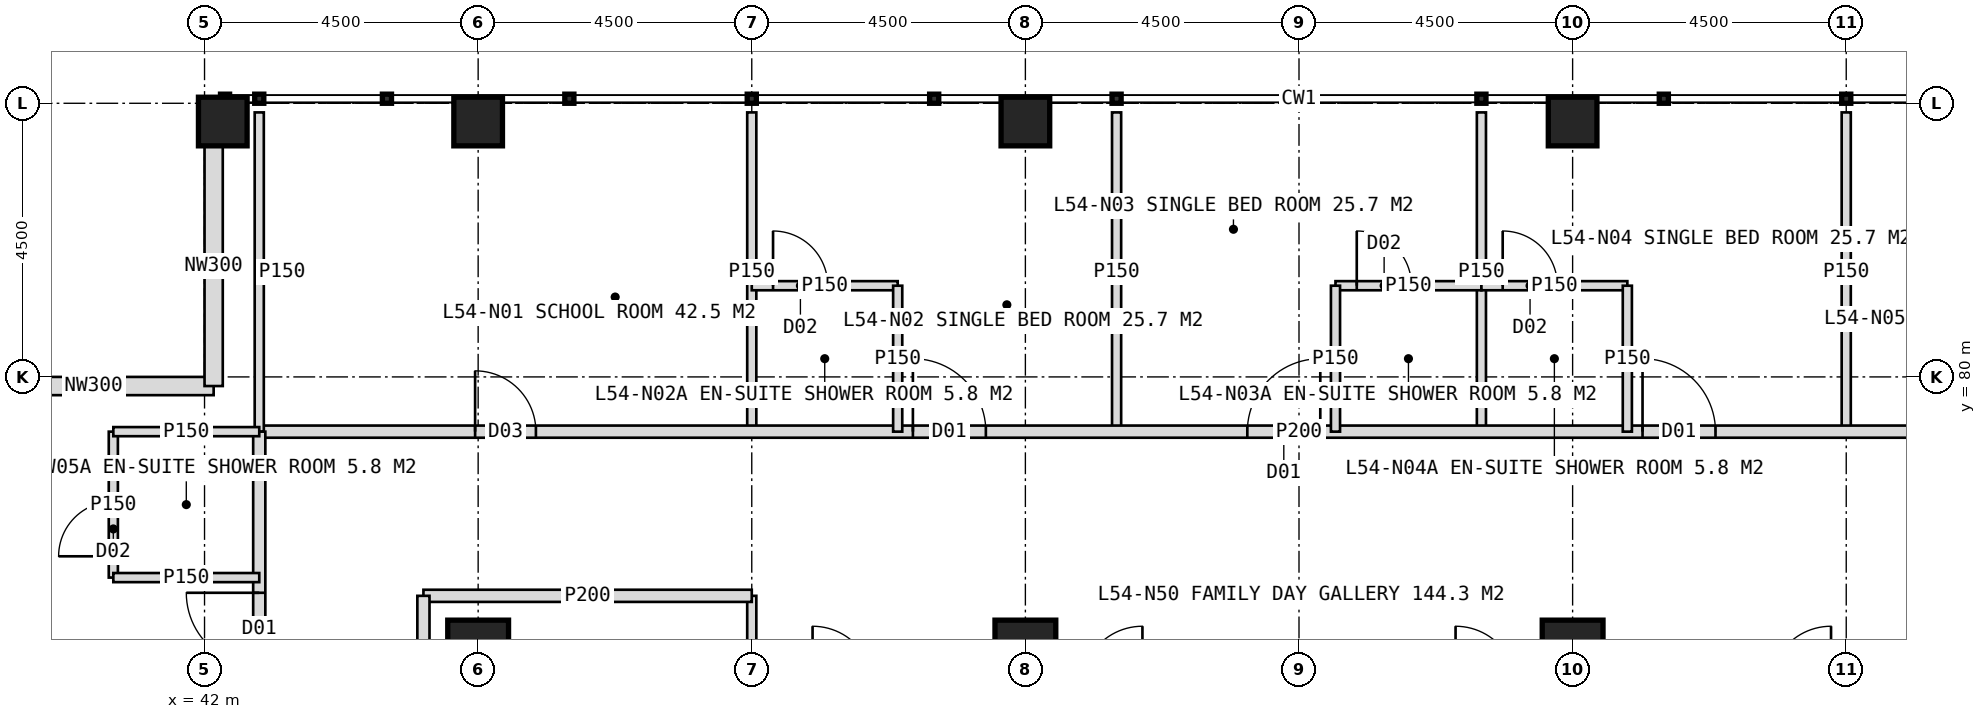
"""IFC4 building model, lengths in metres.
Left out: names, types, materials, properties, quantities, classifications, styles, units other than length and angle.
Written with IfcOpenShell. Run it as: python <this file> out.ifc"""

import sys

from ifc_helpers import new_model, si_unit, direction, frame, frame_2d, origin, origin_2d, place, context, subcontext, project, spatial, rectangle, hollow_rectangle, extrude, element, fill, save


model = new_model("IFC4")
c1 = context("Model", 3, precision=1e-05, world=origin(), true_north=direction((0.0, 1.0)))
c2 = subcontext(c1, "Body", "Model", "MODEL_VIEW")
j1 = project(units=[si_unit("LENGTHUNIT", "METRE"), si_unit("PLANEANGLEUNIT", "RADIAN")], contexts=[c1])
p1 = place(None, origin())
s1 = spatial("IfcSite", under=j1, at=p1, CompositionType="ELEMENT")
p2 = place(p1, origin())
s2 = spatial("IfcBuilding", under=s1, at=p2, CompositionType="ELEMENT")
p3 = place(p2, frame((0.0, 0.0, 225.0)))
s3 = spatial("IfcBuildingStorey", under=s2, at=p3, CompositionType="ELEMENT", Elevation=225.0)
for number, where, z_axis, x_axis in (
    (1, (46.5, 75.5, 0.0), (0.0, 0.0, 1.0), (1.0, 0.0, 0.0)),
    (2, (55.5, 75.5, 0.0), (0.0, 0.0, 1.0), (1.0, 0.0, 0.0)),
    (3, (64.5, 75.5, 0.0), (0.0, 0.0, 1.0), (1.0, 0.0, 0.0)),
):
    element("IfcColumn", number, at=place(p3, frame(where, z_axis=z_axis, x_axis=x_axis)), inside=s3, PredefinedType="COLUMN", context=c2, shape_type="SweptSolid", body=[
        extrude(hollow_rectangle(XDim=1.0, YDim=1.0, WallThickness=0.1, at=origin_2d()), origin(), (0.0, 0.0, 1.0), 4.0),
    ])
for number, where, z_axis, x_axis in (
    (4, (42.3, 84.2, 0.0), (0.0, 0.0, 1.0), (1.0, 0.0, 0.0)),
    (5, (46.5, 84.2, 0.0), (0.0, 0.0, 1.0), (1.0, 0.0, 0.0)),
    (6, (55.5, 84.2, 0.0), (0.0, 0.0, 1.0), (1.0, 0.0, 0.0)),
    (7, (64.5, 84.2, 0.0), (0.0, 0.0, 1.0), (1.0, 0.0, 0.0)),
):
    element("IfcColumn", number, at=place(p3, frame(where, z_axis=z_axis, x_axis=x_axis)), inside=s3, PredefinedType="COLUMN", context=c2, shape_type="SweptSolid", body=[
        extrude(hollow_rectangle(XDim=0.8, YDim=0.8, WallThickness=0.08, at=origin_2d()), origin(), (0.0, 0.0, 1.0), 4.0),
    ])
for number, where, z_axis, x_axis in (
    (8, (38.2, 79.85, 0.0), (0.0, 0.0, 1.0), (1.0, 0.0, 0.0)),
    (9, (42.15, 79.85, 0.0), (0.0, 0.0, 1.0), (0.0, 1.0, 0.0)),
):
    element("IfcWall", number, at=place(p3, frame(where, z_axis=z_axis, x_axis=x_axis)), inside=s3, PredefinedType="ELEMENTEDWALL", context=c2, shape_type="SweptSolid", body=[
        extrude(rectangle(XDim=3.95, YDim=0.3, at=frame_2d((1.975, 0.0))), origin(), (0.0, 0.0, 1.0), 2.85),
    ])
for number, where, z_axis, x_axis in (
    (10, (51.0, 79.1, 0.0), (0.0, 0.0, 1.0), (0.0, 1.0, 0.0)),
    (11, (57.0, 79.1, 0.0), (0.0, 0.0, 1.0), (0.0, 1.0, 0.0)),
    (12, (63.0, 79.1, 0.0), (0.0, 0.0, 1.0), (0.0, 1.0, 0.0)),
    (13, (69.0, 79.1, 0.0), (0.0, 0.0, 1.0), (0.0, 1.0, 0.0)),
):
    element("IfcWall", number, at=place(p3, frame(where, z_axis=z_axis, x_axis=x_axis)), inside=s3, PredefinedType="PARTITIONING", context=c2, shape_type="SweptSolid", body=[
        extrude(rectangle(XDim=5.25, YDim=0.15, at=frame_2d((2.625, 0.0))), origin(), (0.0, 0.0, 1.0), 3.75),
    ])
p4 = place(p3, frame((42.9, 79.1, 0.0), z_axis=(0.0, 0.0, 1.0), x_axis=(1.0, 0.0, 0.0)))
e14 = element("IfcWall", 14, at=p4, inside=s3, PredefinedType="PARTITIONING", context=c2, shape_type="SweptSolid", body=[
    extrude(rectangle(XDim=34.2, YDim=0.2, at=frame_2d((17.1, 0.0))), origin(), (0.0, 0.0, 1.0), 3.75),
])
p5 = place(p4, frame((3.55, 0.0, 0.0)))
e15 = element("IfcOpeningElement", 15, at=p5, cuts=e14, PredefinedType="OPENING", context=c2, shape_type="SweptSolid", body=[
    extrude(rectangle(XDim=1.0, YDim=2.1, at=frame_2d((0.5, 1.05))), frame((0.0, 0.11, 0.0), z_axis=(0.0, -1.0, 0.0), x_axis=(1.0, 0.0, 0.0)), (0.0, 0.0, 1.0), 0.22),
])
p6 = place(p4, frame((10.75, 0.0, 0.0)))
e16 = element("IfcOpeningElement", 16, at=p6, cuts=e14, PredefinedType="OPENING", context=c2, shape_type="SweptSolid", body=[
    extrude(rectangle(XDim=1.2, YDim=2.2, at=frame_2d((0.6, 1.1))), frame((0.0, 0.11, 0.0), z_axis=(0.0, -1.0, 0.0), x_axis=(1.0, 0.0, 0.0)), (0.0, 0.0, 1.0), 0.22),
])
p7 = place(p4, frame((16.25, 0.0, 0.0)))
e17 = element("IfcOpeningElement", 17, at=p7, cuts=e14, PredefinedType="OPENING", context=c2, shape_type="SweptSolid", body=[
    extrude(rectangle(XDim=1.2, YDim=2.2, at=frame_2d((0.6, 1.1))), frame((0.0, 0.11, 0.0), z_axis=(0.0, -1.0, 0.0), x_axis=(1.0, 0.0, 0.0)), (0.0, 0.0, 1.0), 0.22),
])
p8 = place(p4, frame((22.75, 0.0, 0.0)))
e18 = element("IfcOpeningElement", 18, at=p8, cuts=e14, PredefinedType="OPENING", context=c2, shape_type="SweptSolid", body=[
    extrude(rectangle(XDim=1.2, YDim=2.2, at=frame_2d((0.6, 1.1))), frame((0.0, 0.11, 0.0), z_axis=(0.0, -1.0, 0.0), x_axis=(1.0, 0.0, 0.0)), (0.0, 0.0, 1.0), 0.22),
])
p9 = place(p4, frame((29.75, 0.0, 0.0)))
e19 = element("IfcOpeningElement", 19, at=p9, cuts=e14, PredefinedType="OPENING", context=c2, shape_type="SweptSolid", body=[
    extrude(rectangle(XDim=1.2, YDim=2.2, at=frame_2d((0.6, 1.1))), frame((0.0, 0.11, 0.0), z_axis=(0.0, -1.0, 0.0), x_axis=(1.0, 0.0, 0.0)), (0.0, 0.0, 1.0), 0.22),
])
p10 = place(p3, frame((42.9, 79.1, 0.0), z_axis=(0.0, 0.0, 1.0), x_axis=(0.0, 1.0, 0.0)))
e20 = element("IfcWall", 20, at=p10, inside=s3, PredefinedType="PARTITIONING", context=c2, shape_type="SweptSolid", body=[
    extrude(rectangle(XDim=5.25, YDim=0.15, at=frame_2d((2.625, 0.0))), origin(), (0.0, 0.0, 1.0), 3.75),
])
p11 = place(p3, frame((51.0, 81.5, 0.0), z_axis=(0.0, 0.0, 1.0), x_axis=(1.0, 0.0, 0.0)))
e21 = element("IfcWall", 21, at=p11, inside=s3, PredefinedType="PARTITIONING", context=c2, shape_type="SweptSolid", body=[
    extrude(rectangle(XDim=2.4, YDim=0.15, at=frame_2d((1.2, 0.0))), origin(), (0.0, 0.0, 1.0), 3.75),
])
p12 = place(p11, frame((0.35, 0.0, 0.0)))
e22 = element("IfcOpeningElement", 22, at=p12, cuts=e21, PredefinedType="OPENING", context=c2, shape_type="SweptSolid", body=[
    extrude(rectangle(XDim=0.9, YDim=2.1, at=frame_2d((0.45, 1.05))), frame((0.0, 0.085, 0.0), z_axis=(0.0, -1.0, 0.0), x_axis=(1.0, 0.0, 0.0)), (0.0, 0.0, 1.0), 0.17),
])
p13 = place(p3, frame((53.4, 79.1, 0.0), z_axis=(0.0, 0.0, 1.0), x_axis=(0.0, 1.0, 0.0)))
e23 = element("IfcWall", 23, at=p13, inside=s3, PredefinedType="PARTITIONING", context=c2, shape_type="SweptSolid", body=[
    extrude(rectangle(XDim=2.4, YDim=0.15, at=frame_2d((1.2, 0.0))), origin(), (0.0, 0.0, 1.0), 3.75),
])
p14 = place(p3, frame((60.6, 81.5, 0.0), z_axis=(0.0, 0.0, 1.0), x_axis=(1.0, 0.0, 0.0)))
e24 = element("IfcWall", 24, at=p14, inside=s3, PredefinedType="PARTITIONING", context=c2, shape_type="SweptSolid", body=[
    extrude(rectangle(XDim=2.4, YDim=0.15, at=frame_2d((1.2, 0.0))), origin(), (0.0, 0.0, 1.0), 3.75),
])
p15 = place(p14, frame((0.35, 0.0, 0.0)))
e25 = element("IfcOpeningElement", 25, at=p15, cuts=e24, PredefinedType="OPENING", context=c2, shape_type="SweptSolid", body=[
    extrude(rectangle(XDim=0.9, YDim=2.1, at=frame_2d((0.45, 1.05))), frame((0.0, 0.085, 0.0), z_axis=(0.0, -1.0, 0.0), x_axis=(1.0, 0.0, 0.0)), (0.0, 0.0, 1.0), 0.17),
])
p16 = place(p3, frame((60.6, 79.1, 0.0), z_axis=(0.0, 0.0, 1.0), x_axis=(0.0, 1.0, 0.0)))
e26 = element("IfcWall", 26, at=p16, inside=s3, PredefinedType="PARTITIONING", context=c2, shape_type="SweptSolid", body=[
    extrude(rectangle(XDim=2.4, YDim=0.15, at=frame_2d((1.2, 0.0))), origin(), (0.0, 0.0, 1.0), 3.75),
])
p17 = place(p3, frame((63.0, 81.5, 0.0), z_axis=(0.0, 0.0, 1.0), x_axis=(1.0, 0.0, 0.0)))
e27 = element("IfcWall", 27, at=p17, inside=s3, PredefinedType="PARTITIONING", context=c2, shape_type="SweptSolid", body=[
    extrude(rectangle(XDim=2.4, YDim=0.15, at=frame_2d((1.2, 0.0))), origin(), (0.0, 0.0, 1.0), 3.75),
])
p18 = place(p17, frame((0.35, 0.0, 0.0)))
e28 = element("IfcOpeningElement", 28, at=p18, cuts=e27, PredefinedType="OPENING", context=c2, shape_type="SweptSolid", body=[
    extrude(rectangle(XDim=0.9, YDim=2.1, at=frame_2d((0.45, 1.05))), frame((0.0, 0.085, 0.0), z_axis=(0.0, -1.0, 0.0), x_axis=(1.0, 0.0, 0.0)), (0.0, 0.0, 1.0), 0.17),
])
p19 = place(p3, frame((65.4, 79.1, 0.0), z_axis=(0.0, 0.0, 1.0), x_axis=(0.0, 1.0, 0.0)))
e29 = element("IfcWall", 29, at=p19, inside=s3, PredefinedType="PARTITIONING", context=c2, shape_type="SweptSolid", body=[
    extrude(rectangle(XDim=2.4, YDim=0.15, at=frame_2d((1.2, 0.0))), origin(), (0.0, 0.0, 1.0), 3.75),
])
p20 = place(p3, frame((51.0, 71.0, 0.0), z_axis=(0.0, 0.0, 1.0), x_axis=(0.0, 1.0, 0.0)))
e30 = element("IfcWall", 30, at=p20, inside=s3, PredefinedType="PARTITIONING", context=c2, shape_type="SweptSolid", body=[
    extrude(rectangle(XDim=5.4, YDim=0.15, at=frame_2d((2.7, 0.0))), origin(), (0.0, 0.0, 1.0), 3.75),
])
p21 = place(p3, frame((45.6, 76.4, 0.0), z_axis=(0.0, 0.0, 1.0), x_axis=(1.0, 0.0, 0.0)))
e31 = element("IfcWall", 31, at=p21, inside=s3, PredefinedType="PARTITIONING", context=c2, shape_type="SweptSolid", body=[
    extrude(rectangle(XDim=5.4, YDim=0.2, at=frame_2d((2.7, 0.0))), origin(), (0.0, 0.0, 1.0), 3.75),
])
p22 = place(p3, frame((42.9, 44.9, 0.0), z_axis=(0.0, 0.0, 1.0), x_axis=(0.0, 1.0, 0.0)))
e32 = element("IfcWall", 32, at=p22, inside=s3, PredefinedType="PARTITIONING", context=c2, shape_type="SweptSolid", body=[
    extrude(rectangle(XDim=34.2, YDim=0.2, at=frame_2d((17.1, 0.0))), origin(), (0.0, 0.0, 1.0), 3.75),
])
p23 = place(p22, frame((1.25, 0.0, 0.0)))
e33 = element("IfcOpeningElement", 33, at=p23, cuts=e32, PredefinedType="OPENING", context=c2, shape_type="SweptSolid", body=[
    extrude(rectangle(XDim=1.2, YDim=2.2, at=frame_2d((0.6, 1.1))), frame((0.0, 0.11, 0.0), z_axis=(0.0, -1.0, 0.0), x_axis=(1.0, 0.0, 0.0)), (0.0, 0.0, 1.0), 0.22),
])
p24 = place(p22, frame((7.75, 0.0, 0.0)))
e34 = element("IfcOpeningElement", 34, at=p24, cuts=e32, PredefinedType="OPENING", context=c2, shape_type="SweptSolid", body=[
    extrude(rectangle(XDim=1.2, YDim=2.2, at=frame_2d((0.6, 1.1))), frame((0.0, 0.11, 0.0), z_axis=(0.0, -1.0, 0.0), x_axis=(1.0, 0.0, 0.0)), (0.0, 0.0, 1.0), 0.22),
])
p25 = place(p22, frame((13.6, 0.0, 0.0)))
e35 = element("IfcOpeningElement", 35, at=p25, cuts=e32, PredefinedType="OPENING", context=c2, shape_type="SweptSolid", body=[
    extrude(rectangle(XDim=1.0, YDim=2.1, at=frame_2d((0.5, 1.05))), frame((0.0, 0.11, 0.0), z_axis=(0.0, -1.0, 0.0), x_axis=(1.0, 0.0, 0.0)), (0.0, 0.0, 1.0), 0.22),
])
p26 = place(p22, frame((19.75, 0.0, 0.0)))
e36 = element("IfcOpeningElement", 36, at=p26, cuts=e32, PredefinedType="OPENING", context=c2, shape_type="SweptSolid", body=[
    extrude(rectangle(XDim=1.2, YDim=2.2, at=frame_2d((0.6, 1.1))), frame((0.0, 0.11, 0.0), z_axis=(0.0, -1.0, 0.0), x_axis=(1.0, 0.0, 0.0)), (0.0, 0.0, 1.0), 0.22),
])
p27 = place(p22, frame((30.35, 0.0, 0.0)))
e37 = element("IfcOpeningElement", 37, at=p27, cuts=e32, PredefinedType="OPENING", context=c2, shape_type="SweptSolid", body=[
    extrude(rectangle(XDim=1.2, YDim=2.2, at=frame_2d((0.6, 1.1))), frame((0.0, 0.11, 0.0), z_axis=(0.0, -1.0, 0.0), x_axis=(1.0, 0.0, 0.0)), (0.0, 0.0, 1.0), 0.22),
])
p28 = place(p3, frame((40.5, 76.7, 0.0), z_axis=(0.0, 0.0, 1.0), x_axis=(0.0, 1.0, 0.0)))
e38 = element("IfcWall", 38, at=p28, inside=s3, PredefinedType="PARTITIONING", context=c2, shape_type="SweptSolid", body=[
    extrude(rectangle(XDim=2.4, YDim=0.15, at=frame_2d((1.2, 0.0))), origin(), (0.0, 0.0, 1.0), 3.75),
])
p29 = place(p28, frame((0.35, 0.0, 0.0)))
e39 = element("IfcOpeningElement", 39, at=p29, cuts=e38, PredefinedType="OPENING", context=c2, shape_type="SweptSolid", body=[
    extrude(rectangle(XDim=0.9, YDim=2.1, at=frame_2d((0.45, 1.05))), frame((0.0, 0.085, 0.0), z_axis=(0.0, -1.0, 0.0), x_axis=(1.0, 0.0, 0.0)), (0.0, 0.0, 1.0), 0.17),
])
for number, where, z_axis, x_axis in (
    (40, (42.9, 76.7, 0.0), (0.0, 0.0, 1.0), (-1.0, 0.0, 0.0)),
    (41, (42.9, 79.1, 0.0), (0.0, 0.0, 1.0), (-1.0, 0.0, 0.0)),
):
    element("IfcWall", number, at=place(p3, frame(where, z_axis=z_axis, x_axis=x_axis)), inside=s3, PredefinedType="PARTITIONING", context=c2, shape_type="SweptSolid", body=[
        extrude(rectangle(XDim=2.4, YDim=0.15, at=frame_2d((1.2, 0.0))), origin(), (0.0, 0.0, 1.0), 3.75),
    ])
p30 = place(p3, frame((45.6, 62.0, 0.0), z_axis=(0.0, 0.0, 1.0), x_axis=(0.0, 1.0, 0.0)))
e42 = element("IfcWall", 42, at=p30, inside=s3, PredefinedType="PARTITIONING", context=c2, shape_type="SweptSolid", body=[
    extrude(rectangle(XDim=14.4, YDim=0.2, at=frame_2d((7.2, 0.0))), origin(), (0.0, 0.0, 1.0), 3.75),
])
p31 = place(p30, frame((2.5, 0.0, 0.0)))
e43 = element("IfcOpeningElement", 43, at=p31, cuts=e42, PredefinedType="OPENING", context=c2, shape_type="SweptSolid", body=[
    extrude(rectangle(XDim=1.0, YDim=2.1, at=frame_2d((0.5, 1.05))), frame((0.0, 0.11, 0.0), z_axis=(0.0, -1.0, 0.0), x_axis=(1.0, 0.0, 0.0)), (0.0, 0.0, 1.0), 0.22),
])
p32 = place(p30, frame((7.0, 0.0, 0.0)))
e44 = element("IfcOpeningElement", 44, at=p32, cuts=e42, PredefinedType="OPENING", context=c2, shape_type="SweptSolid", body=[
    extrude(rectangle(XDim=1.0, YDim=2.1, at=frame_2d((0.5, 1.05))), frame((0.0, 0.11, 0.0), z_axis=(0.0, -1.0, 0.0), x_axis=(1.0, 0.0, 0.0)), (0.0, 0.0, 1.0), 0.22),
])
p33 = place(p30, frame((11.2, 0.0, 0.0)))
e45 = element("IfcOpeningElement", 45, at=p33, cuts=e42, PredefinedType="OPENING", context=c2, shape_type="SweptSolid", body=[
    extrude(rectangle(XDim=1.0, YDim=2.1, at=frame_2d((0.5, 1.05))), frame((0.0, 0.11, 0.0), z_axis=(0.0, -1.0, 0.0), x_axis=(1.0, 0.0, 0.0)), (0.0, 0.0, 1.0), 0.22),
])
p34 = place(p5, origin())
e46 = element("IfcDoor", 46, at=p34, inside=s3, OperationType="SINGLE_SWING_LEFT", PredefinedType="DOOR", context=c2, shape_type="SweptSolid", body=[
    extrude(rectangle(XDim=1.0, YDim=2.1, at=frame_2d((0.5, 1.05))), frame((0.0, 0.025, 0.0), z_axis=(0.0, -1.0, 0.0), x_axis=(1.0, 0.0, 0.0)), (0.0, 0.0, 1.0), 0.05),
])
fill(e15, e46)
p35 = place(p6, origin())
e47 = element("IfcDoor", 47, at=p35, inside=s3, OperationType="SINGLE_SWING_LEFT", PredefinedType="DOOR", context=c2, shape_type="SweptSolid", body=[
    extrude(rectangle(XDim=1.2, YDim=2.2, at=frame_2d((0.6, 1.1))), frame((0.0, 0.025, 0.0), z_axis=(0.0, -1.0, 0.0), x_axis=(1.0, 0.0, 0.0)), (0.0, 0.0, 1.0), 0.05),
])
fill(e16, e47)
p36 = place(p12, origin())
e48 = element("IfcDoor", 48, at=p36, inside=s3, OperationType="SINGLE_SWING_LEFT", PredefinedType="DOOR", context=c2, shape_type="SweptSolid", body=[
    extrude(rectangle(XDim=0.9, YDim=2.1, at=frame_2d((0.45, 1.05))), frame((0.0, 0.025, 0.0), z_axis=(0.0, -1.0, 0.0), x_axis=(1.0, 0.0, 0.0)), (0.0, 0.0, 1.0), 0.05),
])
fill(e22, e48)
p37 = place(p7, origin())
e49 = element("IfcDoor", 49, at=p37, inside=s3, OperationType="SINGLE_SWING_RIGHT", PredefinedType="DOOR", context=c2, shape_type="SweptSolid", body=[
    extrude(rectangle(XDim=1.2, YDim=2.2, at=frame_2d((0.6, 1.1))), frame((0.0, 0.025, 0.0), z_axis=(0.0, -1.0, 0.0), x_axis=(1.0, 0.0, 0.0)), (0.0, 0.0, 1.0), 0.05),
])
fill(e17, e49)
p38 = place(p15, origin())
e50 = element("IfcDoor", 50, at=p38, inside=s3, OperationType="SINGLE_SWING_LEFT", PredefinedType="DOOR", context=c2, shape_type="SweptSolid", body=[
    extrude(rectangle(XDim=0.9, YDim=2.1, at=frame_2d((0.45, 1.05))), frame((0.0, 0.025, 0.0), z_axis=(0.0, -1.0, 0.0), x_axis=(1.0, 0.0, 0.0)), (0.0, 0.0, 1.0), 0.05),
])
fill(e25, e50)
p39 = place(p8, origin())
e51 = element("IfcDoor", 51, at=p39, inside=s3, OperationType="SINGLE_SWING_LEFT", PredefinedType="DOOR", context=c2, shape_type="SweptSolid", body=[
    extrude(rectangle(XDim=1.2, YDim=2.2, at=frame_2d((0.6, 1.1))), frame((0.0, 0.025, 0.0), z_axis=(0.0, -1.0, 0.0), x_axis=(1.0, 0.0, 0.0)), (0.0, 0.0, 1.0), 0.05),
])
fill(e18, e51)
p40 = place(p18, origin())
e52 = element("IfcDoor", 52, at=p40, inside=s3, OperationType="SINGLE_SWING_LEFT", PredefinedType="DOOR", context=c2, shape_type="SweptSolid", body=[
    extrude(rectangle(XDim=0.9, YDim=2.1, at=frame_2d((0.45, 1.05))), frame((0.0, 0.025, 0.0), z_axis=(0.0, -1.0, 0.0), x_axis=(1.0, 0.0, 0.0)), (0.0, 0.0, 1.0), 0.05),
])
fill(e28, e52)
p41 = place(p27, origin())
e53 = element("IfcDoor", 53, at=p41, inside=s3, OperationType="SINGLE_SWING_RIGHT", PredefinedType="DOOR", context=c2, shape_type="SweptSolid", body=[
    extrude(rectangle(XDim=1.2, YDim=2.2, at=frame_2d((0.6, 1.1))), frame((0.0, 0.025, 0.0), z_axis=(0.0, -1.0, 0.0), x_axis=(1.0, 0.0, 0.0)), (0.0, 0.0, 1.0), 0.05),
])
fill(e37, e53)
p42 = place(p29, origin())
e54 = element("IfcDoor", 54, at=p42, inside=s3, OperationType="SINGLE_SWING_LEFT", PredefinedType="DOOR", context=c2, shape_type="SweptSolid", body=[
    extrude(rectangle(XDim=0.9, YDim=2.1, at=frame_2d((0.45, 1.05))), frame((0.0, 0.025, 0.0), z_axis=(0.0, -1.0, 0.0), x_axis=(1.0, 0.0, 0.0)), (0.0, 0.0, 1.0), 0.05),
])
fill(e39, e54)
save(model, sys.argv[1])
